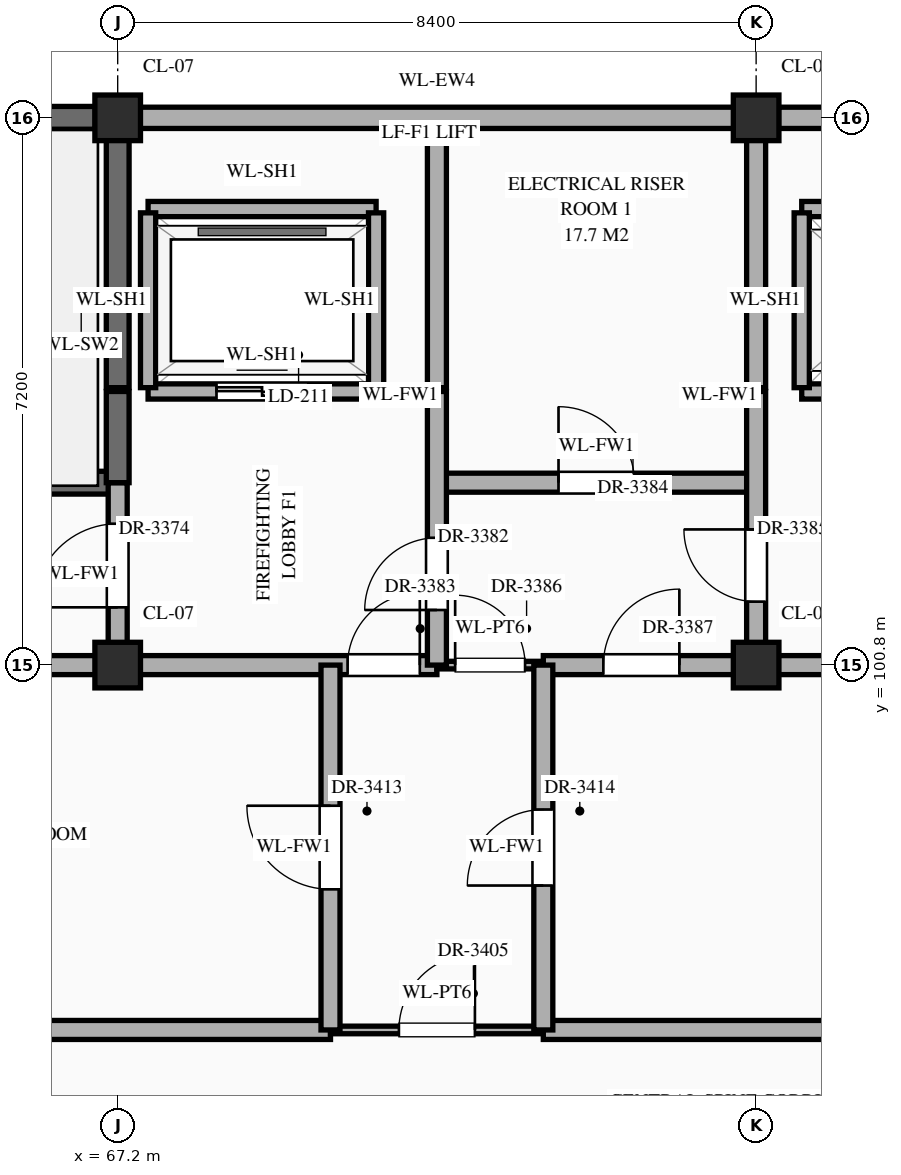
"""IFC4 building model, lengths in metres.
Left out: names, types, materials, properties, quantities, classifications, styles, units other than length and angle.
Written with IfcOpenShell. Run it as: python <this file> out.ifc"""

import sys

from ifc_helpers import new_model, si_unit, direction, frame, frame_2d, origin, origin_2d, place, context, subcontext, project, spatial, rectangle, extrude, element, fill, save


model = new_model("IFC4")
c1 = context("Model", 3, precision=1e-05, world=origin(), true_north=direction((0.0, 1.0)))
c2 = subcontext(c1, "Body", "Model", "MODEL_VIEW")
j1 = project(units=[si_unit("LENGTHUNIT", "METRE"), si_unit("PLANEANGLEUNIT", "RADIAN")], contexts=[c1])
p1 = place(None, origin())
s1 = spatial("IfcSite", under=j1, at=p1, CompositionType="ELEMENT")
p2 = place(p1, origin())
s2 = spatial("IfcBuilding", under=s1, at=p2, CompositionType="ELEMENT")
p3 = place(p2, frame((0.0, 0.0, 68.7)))
s3 = spatial("IfcBuildingStorey", under=s2, at=p3, CompositionType="ELEMENT", Elevation=68.7)
for number, where, z_axis, x_axis in (
    (1, (67.2, 100.8, 0.0), (0.0, 0.0, 1.0), (1.0, 0.0, 0.0)),
    (2, (67.2, 108.0, 0.0), (0.0, 0.0, 1.0), (1.0, 0.0, 0.0)),
    (3, (75.6, 100.8, 0.0), (0.0, 0.0, 1.0), (1.0, 0.0, 0.0)),
    (4, (75.6, 108.0, 0.0), (0.0, 0.0, 1.0), (1.0, 0.0, 0.0)),
):
    element("IfcColumn", number, at=place(p3, frame(where, z_axis=z_axis, x_axis=x_axis)), inside=s3, PredefinedType="COLUMN", context=c2, shape_type="SweptSolid", body=[
        extrude(rectangle(XDim=0.6, YDim=0.6, at=origin_2d()), origin(), (0.0, 0.0, 1.0), 4.5),
    ])
p4 = place(p3, frame((59.095, 108.0, 0.0), z_axis=(0.0, 0.0, 1.0), x_axis=(1.0, 0.0, 0.0)))
e5 = element("IfcWall", 5, at=p4, inside=s3, PredefinedType="SHEAR", context=c2, shape_type="SweptSolid", body=[
    extrude(rectangle(XDim=7.81, YDim=0.3, at=frame_2d((3.905, 0.0))), origin(), (0.0, 0.0, 1.0), 4.12),
])
p5 = place(p3, frame((67.495, 108.0, 0.0), z_axis=(0.0, 0.0, 1.0), x_axis=(1.0, 0.0, 0.0)))
e6 = element("IfcWall", 6, at=p5, inside=s3, PredefinedType="STANDARD", context=c2, shape_type="SweptSolid", body=[
    extrude(rectangle(XDim=7.81, YDim=0.28, at=frame_2d((3.905, 0.0))), origin(), (0.0, 0.0, 1.0), 3.47),
])
p6 = place(p3, frame((75.895, 108.0, 0.0), z_axis=(0.0, 0.0, 1.0), x_axis=(1.0, 0.0, 0.0)))
e7 = element("IfcWall", 7, at=p6, inside=s3, PredefinedType="STANDARD", context=c2, shape_type="SweptSolid", body=[
    extrude(rectangle(XDim=7.81, YDim=0.28, at=frame_2d((3.905, 0.0))), origin(), (0.0, 0.0, 1.0), 3.47),
])
p7 = place(p3, frame((58.84, 96.0, 0.0), z_axis=(0.0, 0.0, 1.0), x_axis=(1.0, 0.0, 0.0)))
e8 = element("IfcWall", 8, at=p7, inside=s3, PredefinedType="STANDARD", context=c2, shape_type="SweptSolid", body=[
    extrude(rectangle(XDim=11.16, YDim=0.25, at=frame_2d((5.58, 0.0))), origin(), (0.0, 0.0, 1.0), 4.12),
])
p8 = place(p7, frame((5.03, 0.0, 0.0)))
e9 = element("IfcOpeningElement", 9, at=p8, cuts=e8, PredefinedType="OPENING", context=c2, shape_type="SweptSolid", body=[
    extrude(rectangle(XDim=1.1, YDim=2.2, at=frame_2d((0.55, 1.1))), frame((0.0, 0.137, 0.0), z_axis=(0.0, -1.0, 0.0), x_axis=(1.0, 0.0, 0.0)), (0.0, 0.0, 1.0), 0.274),
])
p9 = place(p3, frame((70.0, 96.0, 0.0), z_axis=(0.0, 0.0, 1.0), x_axis=(1.0, 0.0, 0.0)))
e10 = element("IfcWall", 10, at=p9, inside=s3, PredefinedType="STANDARD", context=c2, shape_type="SweptSolid", body=[
    extrude(rectangle(XDim=2.8, YDim=0.1, at=frame_2d((1.4, 0.0))), origin(), (0.0, 0.0, 1.0), 4.12),
])
p10 = place(p9, frame((0.9, 0.0, 0.0)))
e11 = element("IfcOpeningElement", 11, at=p10, cuts=e10, PredefinedType="OPENING", context=c2, shape_type="SweptSolid", body=[
    extrude(rectangle(XDim=1.0, YDim=2.25, at=frame_2d((0.5, 1.125))), frame((0.0, 0.062, 0.0), z_axis=(0.0, -1.0, 0.0), x_axis=(1.0, 0.0, 0.0)), (0.0, 0.0, 1.0), 0.124),
])
p11 = place(p3, frame((72.8, 96.0, 0.0), z_axis=(0.0, 0.0, 1.0), x_axis=(1.0, 0.0, 0.0)))
e12 = element("IfcWall", 12, at=p11, inside=s3, PredefinedType="STANDARD", context=c2, shape_type="SweptSolid", body=[
    extrude(rectangle(XDim=22.4, YDim=0.25, at=frame_2d((11.2, 0.0))), origin(), (0.0, 0.0, 1.0), 4.12),
])
p12 = place(p11, frame((5.125, 0.0, 0.0)))
e13 = element("IfcOpeningElement", 13, at=p12, cuts=e12, PredefinedType="OPENING", context=c2, shape_type="SweptSolid", body=[
    extrude(rectangle(XDim=0.95, YDim=2.15, at=frame_2d((0.475, 1.075))), frame((0.0, 0.137, 0.0), z_axis=(0.0, -1.0, 0.0), x_axis=(1.0, 0.0, 0.0)), (0.0, 0.0, 1.0), 0.274),
])
p13 = place(p11, frame((16.3, 0.0, 0.0)))
e14 = element("IfcOpeningElement", 14, at=p13, cuts=e12, PredefinedType="OPENING", context=c2, shape_type="SweptSolid", body=[
    extrude(rectangle(XDim=1.0, YDim=2.2, at=frame_2d((0.5, 1.1))), frame((0.0, 0.137, 0.0), z_axis=(0.0, -1.0, 0.0), x_axis=(1.0, 0.0, 0.0)), (0.0, 0.0, 1.0), 0.274),
])
p14 = place(p3, frame((58.84, 100.8, 0.0), z_axis=(0.0, 0.0, 1.0), x_axis=(1.0, 0.0, 0.0)))
e15 = element("IfcWall", 15, at=p14, inside=s3, PredefinedType="STANDARD", context=c2, shape_type="SweptSolid", body=[
    extrude(rectangle(XDim=12.56, YDim=0.25, at=frame_2d((6.28, 0.0))), origin(), (0.0, 0.0, 1.0), 3.27),
])
p15 = place(p14, frame((3.66, 0.0, 0.0)))
e16 = element("IfcOpeningElement", 16, at=p15, cuts=e15, PredefinedType="OPENING", context=c2, shape_type="SweptSolid", body=[
    extrude(rectangle(XDim=1.0, YDim=2.2, at=frame_2d((0.5, 1.1))), frame((0.0, 0.137, 0.0), z_axis=(0.0, -1.0, 0.0), x_axis=(1.0, 0.0, 0.0)), (0.0, 0.0, 1.0), 0.274),
])
p16 = place(p14, frame((11.385, 0.0, 0.0)))
e17 = element("IfcOpeningElement", 17, at=p16, cuts=e15, PredefinedType="OPENING", context=c2, shape_type="SweptSolid", body=[
    extrude(rectangle(XDim=0.95, YDim=2.15, at=frame_2d((0.475, 1.075))), frame((0.0, 0.137, 0.0), z_axis=(0.0, -1.0, 0.0), x_axis=(1.0, 0.0, 0.0)), (0.0, 0.0, 1.0), 0.274),
])
p17 = place(p3, frame((71.4, 100.8, 0.0), z_axis=(0.0, 0.0, 1.0), x_axis=(1.0, 0.0, 0.0)))
e18 = element("IfcWall", 18, at=p17, inside=s3, PredefinedType="STANDARD", context=c2, shape_type="SweptSolid", body=[
    extrude(rectangle(XDim=1.4, YDim=0.1, at=frame_2d((0.7, 0.0))), origin(), (0.0, 0.0, 1.0), 3.27),
])
p18 = place(p17, frame((0.24, 0.0, 0.0)))
e19 = element("IfcOpeningElement", 19, at=p18, cuts=e18, PredefinedType="OPENING", context=c2, shape_type="SweptSolid", body=[
    extrude(rectangle(XDim=0.92, YDim=2.15, at=frame_2d((0.46, 1.075))), frame((0.0, 0.062, 0.0), z_axis=(0.0, -1.0, 0.0), x_axis=(1.0, 0.0, 0.0)), (0.0, 0.0, 1.0), 0.124),
])
p19 = place(p3, frame((72.8, 100.8, 0.0), z_axis=(0.0, 0.0, 1.0), x_axis=(1.0, 0.0, 0.0)))
e20 = element("IfcWall", 20, at=p19, inside=s3, PredefinedType="STANDARD", context=c2, shape_type="SweptSolid", body=[
    extrude(rectangle(XDim=22.4, YDim=0.25, at=frame_2d((11.2, 0.0))), origin(), (0.0, 0.0, 1.0), 3.27),
])
p20 = place(p19, frame((0.79, 0.0, 0.0)))
e21 = element("IfcOpeningElement", 21, at=p20, cuts=e20, PredefinedType="OPENING", context=c2, shape_type="SweptSolid", body=[
    extrude(rectangle(XDim=1.0, YDim=2.2, at=frame_2d((0.5, 1.1))), frame((0.0, 0.137, 0.0), z_axis=(0.0, -1.0, 0.0), x_axis=(1.0, 0.0, 0.0)), (0.0, 0.0, 1.0), 0.274),
])
p21 = place(p19, frame((20.635, 0.0, 0.0)))
e22 = element("IfcOpeningElement", 22, at=p21, cuts=e20, PredefinedType="OPENING", context=c2, shape_type="SweptSolid", body=[
    extrude(rectangle(XDim=0.95, YDim=2.15, at=frame_2d((0.475, 1.075))), frame((0.0, 0.137, 0.0), z_axis=(0.0, -1.0, 0.0), x_axis=(1.0, 0.0, 0.0)), (0.0, 0.0, 1.0), 0.274),
])
p22 = place(p19, frame((6.45, 0.0, 0.0)))
e23 = element("IfcOpeningElement", 23, at=p22, cuts=e20, PredefinedType="OPENING", context=c2, shape_type="SweptSolid", body=[
    extrude(rectangle(XDim=1.1, YDim=2.2, at=frame_2d((0.55, 1.1))), frame((0.0, 0.137, 0.0), z_axis=(0.0, -1.0, 0.0), x_axis=(1.0, 0.0, 0.0)), (0.0, 0.0, 1.0), 0.274),
])
p23 = place(p19, frame((14.9, 0.0, 0.0)))
e24 = element("IfcOpeningElement", 24, at=p23, cuts=e20, PredefinedType="OPENING", context=c2, shape_type="SweptSolid", body=[
    extrude(rectangle(XDim=1.0, YDim=2.2, at=frame_2d((0.5, 1.1))), frame((0.0, 0.137, 0.0), z_axis=(0.0, -1.0, 0.0), x_axis=(1.0, 0.0, 0.0)), (0.0, 0.0, 1.0), 0.274),
])
p24 = place(p3, frame((58.84, 103.2, 0.0), z_axis=(0.0, 0.0, 1.0), x_axis=(1.0, 0.0, 0.0)))
e25 = element("IfcWall", 25, at=p24, inside=s3, PredefinedType="SHEAR", context=c2, shape_type="SweptSolid", body=[
    extrude(rectangle(XDim=8.36, YDim=0.3, at=frame_2d((4.18, 0.0))), origin(), (0.0, 0.0, 1.0), 4.12),
])
p25 = place(p24, frame((0.61, 0.0, 0.0)))
e26 = element("IfcOpeningElement", 26, at=p25, cuts=e25, PredefinedType="OPENING", context=c2, shape_type="SweptSolid", body=[
    extrude(rectangle(XDim=1.1, YDim=2.2, at=frame_2d((0.55, 1.1))), frame((0.0, 0.162, 0.0), z_axis=(0.0, -1.0, 0.0), x_axis=(1.0, 0.0, 0.0)), (0.0, 0.0, 1.0), 0.324),
])
p26 = place(p3, frame((71.4, 103.2, 0.0), z_axis=(0.0, 0.0, 1.0), x_axis=(1.0, 0.0, 0.0)))
e27 = element("IfcWall", 27, at=p26, inside=s3, PredefinedType="STANDARD", context=c2, shape_type="SweptSolid", body=[
    extrude(rectangle(XDim=4.2, YDim=0.25, at=frame_2d((2.1, 0.0))), origin(), (0.0, 0.0, 1.0), 4.12),
])
p27 = place(p26, frame((1.6, 0.0, 0.0)))
e28 = element("IfcOpeningElement", 28, at=p27, cuts=e27, PredefinedType="OPENING", context=c2, shape_type="SweptSolid", body=[
    extrude(rectangle(XDim=1.0, YDim=2.2, at=frame_2d((0.5, 1.1))), frame((0.0, 0.137, 0.0), z_axis=(0.0, -1.0, 0.0), x_axis=(1.0, 0.0, 0.0)), (0.0, 0.0, 1.0), 0.274),
])
p28 = place(p3, frame((67.6, 104.4, 0.0), z_axis=(0.0, 0.0, 1.0), x_axis=(1.0, 0.0, 0.0)))
e29 = element("IfcWall", 29, at=p28, inside=s3, PredefinedType="STANDARD", context=c2, shape_type="SweptSolid", body=[
    extrude(rectangle(XDim=3.0, YDim=0.2, at=frame_2d((1.5, 0.0))), origin(), (0.0, 0.0, 1.0), 4.12),
])
p29 = place(p28, frame((0.9, 0.0, 0.0)))
e30 = element("IfcOpeningElement", 30, at=p29, cuts=e29, PredefinedType="OPENING", context=c2, shape_type="SweptSolid", body=[
    extrude(rectangle(XDim=1.2, YDim=2.15, at=frame_2d((0.6, 1.075))), frame((0.0, 0.112, 0.0), z_axis=(0.0, -1.0, 0.0), x_axis=(1.0, 0.0, 0.0)), (0.0, 0.0, 1.0), 0.224),
])
p30 = place(p3, frame((76.2, 104.4, 0.0), z_axis=(0.0, 0.0, 1.0), x_axis=(1.0, 0.0, 0.0)))
e31 = element("IfcWall", 31, at=p30, inside=s3, PredefinedType="STANDARD", context=c2, shape_type="SweptSolid", body=[
    extrude(rectangle(XDim=2.4, YDim=0.2, at=frame_2d((1.2, 0.0))), origin(), (0.0, 0.0, 1.0), 4.12),
])
p31 = place(p30, frame((0.7, 0.0, 0.0)))
e32 = element("IfcOpeningElement", 32, at=p31, cuts=e31, PredefinedType="OPENING", context=c2, shape_type="SweptSolid", body=[
    extrude(rectangle(XDim=1.0, YDim=2.15, at=frame_2d((0.5, 1.075))), frame((0.0, 0.112, 0.0), z_axis=(0.0, -1.0, 0.0), x_axis=(1.0, 0.0, 0.0)), (0.0, 0.0, 1.0), 0.224),
])
p32 = place(p3, frame((67.6, 106.8, 0.0), z_axis=(0.0, 0.0, 1.0), x_axis=(1.0, 0.0, 0.0)))
e33 = element("IfcWall", 33, at=p32, inside=s3, PredefinedType="STANDARD", context=c2, shape_type="SweptSolid", body=[
    extrude(rectangle(XDim=3.0, YDim=0.2, at=frame_2d((1.5, 0.0))), origin(), (0.0, 0.0, 1.0), 4.12),
])
p33 = place(p3, frame((76.2, 106.8, 0.0), z_axis=(0.0, 0.0, 1.0), x_axis=(1.0, 0.0, 0.0)))
e34 = element("IfcWall", 34, at=p33, inside=s3, PredefinedType="STANDARD", context=c2, shape_type="SweptSolid", body=[
    extrude(rectangle(XDim=2.4, YDim=0.2, at=frame_2d((1.2, 0.0))), origin(), (0.0, 0.0, 1.0), 4.12),
])
p34 = place(p3, frame((67.2, 100.8, 0.0), z_axis=(0.0, 0.0, 1.0), x_axis=(0.0, 1.0, 0.0)))
e35 = element("IfcWall", 35, at=p34, inside=s3, PredefinedType="STANDARD", context=c2, shape_type="SweptSolid", body=[
    extrude(rectangle(XDim=2.4, YDim=0.25, at=frame_2d((1.2, 0.0))), origin(), (0.0, 0.0, 1.0), 3.37),
])
p35 = place(p34, frame((0.76, 0.0, 0.0)))
e36 = element("IfcOpeningElement", 36, at=p35, cuts=e35, PredefinedType="OPENING", context=c2, shape_type="SweptSolid", body=[
    extrude(rectangle(XDim=1.1, YDim=2.2, at=frame_2d((0.55, 1.1))), frame((0.0, 0.137, 0.0), z_axis=(0.0, -1.0, 0.0), x_axis=(1.0, 0.0, 0.0)), (0.0, 0.0, 1.0), 0.274),
])
p36 = place(p3, frame((67.2, 103.2, 0.0), z_axis=(0.0, 0.0, 1.0), x_axis=(0.0, 1.0, 0.0)))
e37 = element("IfcWall", 37, at=p36, inside=s3, PredefinedType="SHEAR", context=c2, shape_type="SweptSolid", body=[
    extrude(rectangle(XDim=1.2, YDim=0.3, at=frame_2d((0.6, 0.0))), origin(), (0.0, 0.0, 1.0), 4.12),
])
p37 = place(p3, frame((67.2, 104.45, 0.0), z_axis=(0.0, 0.0, 1.0), x_axis=(0.0, 1.0, 0.0)))
e38 = element("IfcWall", 38, at=p37, inside=s3, PredefinedType="SHEAR", context=c2, shape_type="SweptSolid", body=[
    extrude(rectangle(XDim=3.46, YDim=0.3, at=frame_2d((1.73, 0.0))), origin(), (0.0, 0.0, 1.0), 4.12),
])
p38 = place(p3, frame((67.6, 104.45, 0.0), z_axis=(0.0, 0.0, 1.0), x_axis=(0.0, 1.0, 0.0)))
e39 = element("IfcWall", 39, at=p38, inside=s3, PredefinedType="STANDARD", context=c2, shape_type="SweptSolid", body=[
    extrude(rectangle(XDim=2.3, YDim=0.2, at=frame_2d((1.15, 0.0))), origin(), (0.0, 0.0, 1.0), 4.12),
])
p39 = place(p3, frame((70.0, 96.0, 0.0), z_axis=(0.0, 0.0, 1.0), x_axis=(0.0, 1.0, 0.0)))
e40 = element("IfcWall", 40, at=p39, inside=s3, PredefinedType="STANDARD", context=c2, shape_type="SweptSolid", body=[
    extrude(rectangle(XDim=4.8, YDim=0.25, at=frame_2d((2.4, 0.0))), origin(), (0.0, 0.0, 1.0), 4.12),
])
p40 = place(p39, frame((1.85, 0.0, 0.0)))
e41 = element("IfcOpeningElement", 41, at=p40, cuts=e40, PredefinedType="OPENING", context=c2, shape_type="SweptSolid", body=[
    extrude(rectangle(XDim=1.1, YDim=2.2, at=frame_2d((0.55, 1.1))), frame((0.0, 0.137, 0.0), z_axis=(0.0, -1.0, 0.0), x_axis=(1.0, 0.0, 0.0)), (0.0, 0.0, 1.0), 0.274),
])
p41 = place(p3, frame((70.6, 104.45, 0.0), z_axis=(0.0, 0.0, 1.0), x_axis=(0.0, 1.0, 0.0)))
e42 = element("IfcWall", 42, at=p41, inside=s3, PredefinedType="STANDARD", context=c2, shape_type="SweptSolid", body=[
    extrude(rectangle(XDim=2.3, YDim=0.2, at=frame_2d((1.15, 0.0))), origin(), (0.0, 0.0, 1.0), 4.12),
])
p42 = place(p3, frame((71.4, 100.8, 0.0), z_axis=(0.0, 0.0, 1.0), x_axis=(0.0, 1.0, 0.0)))
e43 = element("IfcWall", 43, at=p42, inside=s3, PredefinedType="STANDARD", context=c2, shape_type="SweptSolid", body=[
    extrude(rectangle(XDim=3.6, YDim=0.25, at=frame_2d((1.8, 0.0))), origin(), (0.0, 0.0, 1.0), 3.77),
])
p43 = place(p42, frame((0.725, 0.0, 0.0)))
e44 = element("IfcOpeningElement", 44, at=p43, cuts=e43, PredefinedType="OPENING", context=c2, shape_type="SweptSolid", body=[
    extrude(rectangle(XDim=0.95, YDim=2.15, at=frame_2d((0.475, 1.075))), frame((0.0, 0.137, 0.0), z_axis=(0.0, -1.0, 0.0), x_axis=(1.0, 0.0, 0.0)), (0.0, 0.0, 1.0), 0.274),
])
p44 = place(p3, frame((71.4, 104.45, 0.0), z_axis=(0.0, 0.0, 1.0), x_axis=(0.0, 1.0, 0.0)))
e45 = element("IfcWall", 45, at=p44, inside=s3, PredefinedType="STANDARD", context=c2, shape_type="SweptSolid", body=[
    extrude(rectangle(XDim=3.46, YDim=0.25, at=frame_2d((1.73, 0.0))), origin(), (0.0, 0.0, 1.0), 3.77),
])
p45 = place(p3, frame((72.8, 96.0, 0.0), z_axis=(0.0, 0.0, 1.0), x_axis=(0.0, 1.0, 0.0)))
e46 = element("IfcWall", 46, at=p45, inside=s3, PredefinedType="STANDARD", context=c2, shape_type="SweptSolid", body=[
    extrude(rectangle(XDim=4.8, YDim=0.25, at=frame_2d((2.4, 0.0))), origin(), (0.0, 0.0, 1.0), 4.12),
])
p46 = place(p45, frame((1.9, 0.0, 0.0)))
e47 = element("IfcOpeningElement", 47, at=p46, cuts=e46, PredefinedType="OPENING", context=c2, shape_type="SweptSolid", body=[
    extrude(rectangle(XDim=1.0, YDim=2.2, at=frame_2d((0.5, 1.1))), frame((0.0, 0.137, 0.0), z_axis=(0.0, -1.0, 0.0), x_axis=(1.0, 0.0, 0.0)), (0.0, 0.0, 1.0), 0.274),
])
p47 = place(p3, frame((75.6, 100.8, 0.0), z_axis=(0.0, 0.0, 1.0), x_axis=(0.0, 1.0, 0.0)))
e48 = element("IfcWall", 48, at=p47, inside=s3, PredefinedType="STANDARD", context=c2, shape_type="SweptSolid", body=[
    extrude(rectangle(XDim=3.6, YDim=0.25, at=frame_2d((1.8, 0.0))), origin(), (0.0, 0.0, 1.0), 3.37),
])
p48 = place(p47, frame((0.835, 0.0, 0.0)))
e49 = element("IfcOpeningElement", 49, at=p48, cuts=e48, PredefinedType="OPENING", context=c2, shape_type="SweptSolid", body=[
    extrude(rectangle(XDim=0.95, YDim=2.15, at=frame_2d((0.475, 1.075))), frame((0.0, 0.137, 0.0), z_axis=(0.0, -1.0, 0.0), x_axis=(1.0, 0.0, 0.0)), (0.0, 0.0, 1.0), 0.274),
])
p49 = place(p3, frame((75.6, 104.45, 0.0), z_axis=(0.0, 0.0, 1.0), x_axis=(0.0, 1.0, 0.0)))
e50 = element("IfcWall", 50, at=p49, inside=s3, PredefinedType="STANDARD", context=c2, shape_type="SweptSolid", body=[
    extrude(rectangle(XDim=3.46, YDim=0.25, at=frame_2d((1.73, 0.0))), origin(), (0.0, 0.0, 1.0), 3.37),
])
p50 = place(p3, frame((76.2, 104.45, 0.0), z_axis=(0.0, 0.0, 1.0), x_axis=(0.0, 1.0, 0.0)))
e51 = element("IfcWall", 51, at=p50, inside=s3, PredefinedType="STANDARD", context=c2, shape_type="SweptSolid", body=[
    extrude(rectangle(XDim=2.3, YDim=0.2, at=frame_2d((1.15, 0.0))), origin(), (0.0, 0.0, 1.0), 4.12),
])
p51 = place(p29, origin())
e52 = element("IfcDoor", 52, at=p51, inside=s3, OperationType="DOUBLE_DOOR_SLIDING", PredefinedType="DOOR", context=c2, shape_type="SweptSolid", body=[
    extrude(rectangle(XDim=1.2, YDim=2.15, at=frame_2d((0.6, 1.075))), frame((0.0, 0.025, 0.0), z_axis=(0.0, -1.0, 0.0), x_axis=(1.0, 0.0, 0.0)), (0.0, 0.0, 1.0), 0.05),
])
fill(e30, e52)
p52 = place(p35, origin())
e53 = element("IfcDoor", 53, at=p52, inside=s3, OperationType="SINGLE_SWING_LEFT", PredefinedType="DOOR", context=c2, shape_type="SweptSolid", body=[
    extrude(rectangle(XDim=1.1, YDim=2.2, at=frame_2d((0.55, 1.1))), frame((0.0, 0.025, 0.0), z_axis=(0.0, -1.0, 0.0), x_axis=(1.0, 0.0, 0.0)), (0.0, 0.0, 1.0), 0.05),
])
fill(e36, e53)
p53 = place(p43, origin())
e54 = element("IfcDoor", 54, at=p53, inside=s3, OperationType="SINGLE_SWING_LEFT", PredefinedType="DOOR", context=c2, shape_type="SweptSolid", body=[
    extrude(rectangle(XDim=0.95, YDim=2.15, at=frame_2d((0.475, 1.075))), frame((0.0, 0.025, 0.0), z_axis=(0.0, -1.0, 0.0), x_axis=(1.0, 0.0, 0.0)), (0.0, 0.0, 1.0), 0.05),
])
fill(e44, e54)
p54 = place(p16, origin())
e55 = element("IfcDoor", 55, at=p54, inside=s3, OperationType="SINGLE_SWING_RIGHT", PredefinedType="DOOR", context=c2, shape_type="SweptSolid", body=[
    extrude(rectangle(XDim=0.95, YDim=2.15, at=frame_2d((0.475, 1.075))), frame((0.0, 0.025, 0.0), z_axis=(0.0, -1.0, 0.0), x_axis=(1.0, 0.0, 0.0)), (0.0, 0.0, 1.0), 0.05),
])
fill(e17, e55)
p55 = place(p27, origin())
e56 = element("IfcDoor", 56, at=p55, inside=s3, OperationType="SINGLE_SWING_LEFT", PredefinedType="DOOR", context=c2, shape_type="SweptSolid", body=[
    extrude(rectangle(XDim=1.0, YDim=2.2, at=frame_2d((0.5, 1.1))), frame((0.0, 0.025, 0.0), z_axis=(0.0, -1.0, 0.0), x_axis=(1.0, 0.0, 0.0)), (0.0, 0.0, 1.0), 0.05),
])
fill(e28, e56)
p56 = place(p48, origin())
e57 = element("IfcDoor", 57, at=p56, inside=s3, OperationType="SINGLE_SWING_RIGHT", PredefinedType="DOOR", context=c2, shape_type="SweptSolid", body=[
    extrude(rectangle(XDim=0.95, YDim=2.15, at=frame_2d((0.475, 1.075))), frame((0.0, 0.025, 0.0), z_axis=(0.0, -1.0, 0.0), x_axis=(1.0, 0.0, 0.0)), (0.0, 0.0, 1.0), 0.05),
])
fill(e49, e57)
p57 = place(p18, origin())
e58 = element("IfcDoor", 58, at=p57, inside=s3, OperationType="SINGLE_SWING_LEFT", PredefinedType="DOOR", context=c2, shape_type="SweptSolid", body=[
    extrude(rectangle(XDim=0.92, YDim=2.15, at=frame_2d((0.46, 1.075))), frame((0.0, 0.025, 0.0), z_axis=(0.0, -1.0, 0.0), x_axis=(1.0, 0.0, 0.0)), (0.0, 0.0, 1.0), 0.05),
])
fill(e19, e58)
p58 = place(p20, origin())
e59 = element("IfcDoor", 59, at=p58, inside=s3, OperationType="SINGLE_SWING_RIGHT", PredefinedType="DOOR", context=c2, shape_type="SweptSolid", body=[
    extrude(rectangle(XDim=1.0, YDim=2.2, at=frame_2d((0.5, 1.1))), frame((0.0, 0.025, 0.0), z_axis=(0.0, -1.0, 0.0), x_axis=(1.0, 0.0, 0.0)), (0.0, 0.0, 1.0), 0.05),
])
fill(e21, e59)
p59 = place(p10, origin())
e60 = element("IfcDoor", 60, at=p59, inside=s3, OperationType="SINGLE_SWING_RIGHT", PredefinedType="DOOR", context=c2, shape_type="SweptSolid", body=[
    extrude(rectangle(XDim=1.0, YDim=2.25, at=frame_2d((0.5, 1.125))), frame((0.0, 0.025, 0.0), z_axis=(0.0, -1.0, 0.0), x_axis=(1.0, 0.0, 0.0)), (0.0, 0.0, 1.0), 0.05),
])
fill(e11, e60)
p60 = place(p40, origin())
e61 = element("IfcDoor", 61, at=p60, inside=s3, OperationType="SINGLE_SWING_RIGHT", PredefinedType="DOOR", context=c2, shape_type="SweptSolid", body=[
    extrude(rectangle(XDim=1.1, YDim=2.2, at=frame_2d((0.55, 1.1))), frame((0.0, 0.025, 0.0), z_axis=(0.0, -1.0, 0.0), x_axis=(1.0, 0.0, 0.0)), (0.0, 0.0, 1.0), 0.05),
])
fill(e41, e61)
p61 = place(p46, origin())
e62 = element("IfcDoor", 62, at=p61, inside=s3, OperationType="SINGLE_SWING_LEFT", PredefinedType="DOOR", context=c2, shape_type="SweptSolid", body=[
    extrude(rectangle(XDim=1.0, YDim=2.2, at=frame_2d((0.5, 1.1))), frame((0.0, 0.025, 0.0), z_axis=(0.0, -1.0, 0.0), x_axis=(1.0, 0.0, 0.0)), (0.0, 0.0, 1.0), 0.05),
])
fill(e47, e62)
save(model, sys.argv[1])
